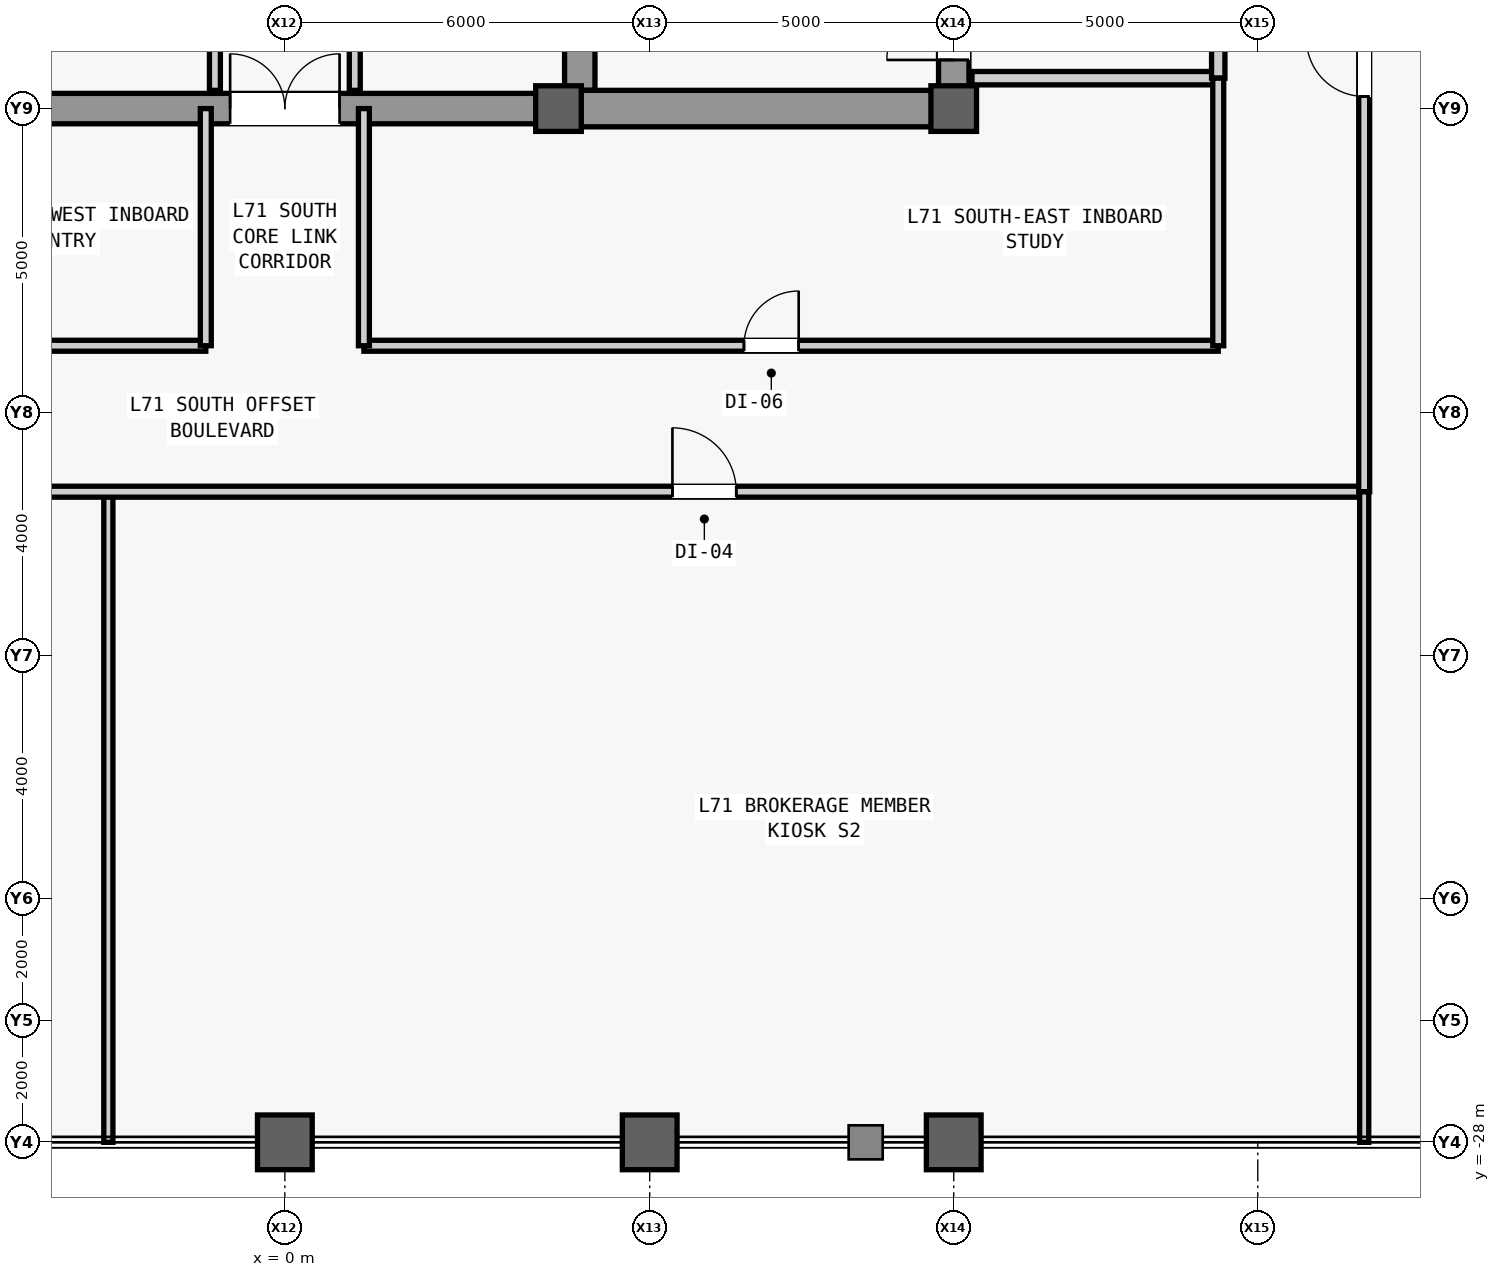
"""IFC4 building model, lengths in metres.
Left out: names, types, materials, properties, quantities, classifications, styles, units other than length and angle.
Written with IfcOpenShell. Run it as: python <this file> out.ifc"""

import sys

from ifc_helpers import new_model, si_unit, direction, frame, frame_2d, origin, origin_2d, place, context, subcontext, project, spatial, rectangle, hollow_rectangle, extrude, source, transform, mapped, element, fill, save


model = new_model("IFC4")
c1 = context("Model", 3, precision=1e-05, world=origin(), true_north=direction((0.0, 1.0)))
c2 = subcontext(c1, "Body", "Model", "MODEL_VIEW")
j1 = project(units=[si_unit("LENGTHUNIT", "METRE"), si_unit("PLANEANGLEUNIT", "RADIAN")], contexts=[c1])
p1 = place(None, origin())
s1 = spatial("IfcSite", under=j1, at=p1, CompositionType="ELEMENT")
p2 = place(p1, origin())
s2 = spatial("IfcBuilding", under=s1, at=p2, CompositionType="ELEMENT")
p3 = place(p2, frame((0.0, 0.0, 301.5)))
s3 = spatial("IfcBuildingStorey", under=s2, at=p3, CompositionType="ELEMENT", Elevation=301.5)
m1 = source(origin(), c2, "Body", "SweptSolid", [
    extrude(rectangle(XDim=22.0, YDim=0.5, at=frame_2d((11.0, 0.0))), origin(), (0.0, 0.0, 1.0), 3.78),
])
p4 = place(p3, frame((11.0, -11.0, 0.0), z_axis=(0.0, 0.0, 1.0), x_axis=(0.0, 1.0, 0.0)))
e1 = element("IfcWall", 1, at=p4, inside=s3, PredefinedType="SHEAR", context=c2, shape_type="MappedRepresentation", body=[
    mapped(m1, transform((0.0, 0.0, 0.0), scale=1.0)),
])
m2 = source(origin(), c2, "Body", "SweptSolid", [
    extrude(rectangle(XDim=1.1, YDim=2.2, at=frame_2d((0.55, 1.1))), frame((0.0, 0.26, 0.0), z_axis=(0.0, -1.0, 0.0), x_axis=(1.0, 0.0, 0.0)), (0.0, 0.0, 1.0), 0.52),
])
p5 = place(p4, frame((0.8, 0.0, 0.0)))
e2 = element("IfcOpeningElement", 2, at=p5, cuts=e1, PredefinedType="OPENING", context=c2, shape_type="MappedRepresentation", body=[
    mapped(m2, transform((0.0, 0.0, 0.0), scale=1.0)),
])
m3 = source(origin(), c2, "Body", "SweptSolid", [
    extrude(rectangle(XDim=0.9, YDim=2.15, at=frame_2d((0.45, 1.075))), frame((0.0, 0.26, 0.0), z_axis=(0.0, -1.0, 0.0), x_axis=(1.0, 0.0, 0.0)), (0.0, 0.0, 1.0), 0.52),
])
p6 = place(p4, frame((6.2, 0.0, 0.0)))
e3 = element("IfcOpeningElement", 3, at=p6, cuts=e1, PredefinedType="OPENING", context=c2, shape_type="MappedRepresentation", body=[
    mapped(m3, transform((0.0, 0.0, 0.0), scale=1.0)),
])
p7 = place(p4, frame((8.05, 0.0, 0.0)))
e4 = element("IfcOpeningElement", 4, at=p7, cuts=e1, PredefinedType="OPENING", context=c2, shape_type="MappedRepresentation", body=[
    mapped(m3, transform((0.0, 0.0, 0.0), scale=1.0)),
])
m4 = source(origin(), c2, "Body", "SweptSolid", [
    extrude(rectangle(XDim=1.2, YDim=2.3, at=frame_2d((0.6, 1.15))), frame((0.0, 0.26, 0.0), z_axis=(0.0, -1.0, 0.0), x_axis=(1.0, 0.0, 0.0)), (0.0, 0.0, 1.0), 0.52),
])
p8 = place(p4, frame((17.6, 0.0, 0.0)))
e5 = element("IfcOpeningElement", 5, at=p8, cuts=e1, PredefinedType="OPENING", context=c2, shape_type="MappedRepresentation", body=[
    mapped(m4, transform((0.0, 0.0, 0.0), scale=1.0)),
])
p9 = place(p4, frame((19.6, 0.0, 0.0)))
e6 = element("IfcOpeningElement", 6, at=p9, cuts=e1, PredefinedType="OPENING", context=c2, shape_type="MappedRepresentation", body=[
    mapped(m4, transform((0.0, 0.0, 0.0), scale=1.0)),
])
m5 = source(origin(), c2, "Body", "SweptSolid", [
    extrude(rectangle(XDim=1.3, YDim=2.3, at=frame_2d((0.65, 1.15))), frame((0.0, 0.26, 0.0), z_axis=(0.0, -1.0, 0.0), x_axis=(1.0, 0.0, 0.0)), (0.0, 0.0, 1.0), 0.52),
])
p10 = place(p4, frame((2.7, 0.0, 0.0)))
e7 = element("IfcOpeningElement", 7, at=p10, cuts=e1, PredefinedType="OPENING", context=c2, shape_type="MappedRepresentation", body=[
    mapped(m5, transform((0.0, 0.0, 0.0), scale=1.0)),
])
p11 = place(p4, frame((13.35, 0.0, 0.0)))
e8 = element("IfcOpeningElement", 8, at=p11, cuts=e1, PredefinedType="OPENING", context=c2, shape_type="MappedRepresentation", body=[
    mapped(m5, transform((0.0, 0.0, 0.0), scale=1.0)),
])
m6 = source(origin(), c2, "Body", "SweptSolid", [
    extrude(rectangle(XDim=21.4, YDim=0.5, at=frame_2d((10.7, 0.0))), origin(), (0.0, 0.0, 1.0), 3.78),
])
p12 = place(p3, frame((4.85, -10.7, 0.0), z_axis=(0.0, 0.0, 1.0), x_axis=(0.0, 1.0, 0.0)))
e9 = element("IfcWall", 9, at=p12, inside=s3, PredefinedType="SHEAR", context=c2, shape_type="MappedRepresentation", body=[
    mapped(m6, transform((0.0, 0.0, 0.0), scale=1.0)),
])
m7 = source(origin(), c2, "Body", "SweptSolid", [
    extrude(rectangle(XDim=5.9, YDim=0.6, at=frame_2d((2.95, 0.0))), origin(), (0.0, 0.0, 1.0), 3.78),
])
p13 = place(p3, frame((4.85, -11.0, 0.0), z_axis=(0.0, 0.0, 1.0), x_axis=(1.0, 0.0, 0.0)))
e10 = element("IfcWall", 10, at=p13, inside=s3, PredefinedType="SHEAR", context=c2, shape_type="MappedRepresentation", body=[
    mapped(m7, transform((0.0, 0.0, 0.0), scale=1.0)),
])
m8 = source(origin(), c2, "Body", "SweptSolid", [
    extrude(rectangle(XDim=9.2, YDim=0.5, at=frame_2d((4.6, 0.0))), origin(), (0.0, 0.0, 1.0), 3.78),
])
p14 = place(p3, frame((-4.6, -11.0, 0.0), z_axis=(0.0, 0.0, 1.0), x_axis=(1.0, 0.0, 0.0)))
e11 = element("IfcWall", 11, at=p14, inside=s3, PredefinedType="SHEAR", context=c2, shape_type="MappedRepresentation", body=[
    mapped(m8, transform((0.0, 0.0, 0.0), scale=1.0)),
])
m9 = source(origin(), c2, "Body", "SweptSolid", [
    extrude(rectangle(XDim=1.8, YDim=2.25, at=frame_2d((0.9, 1.125))), frame((0.0, 0.26, 0.0), z_axis=(0.0, -1.0, 0.0), x_axis=(1.0, 0.0, 0.0)), (0.0, 0.0, 1.0), 0.52),
])
p15 = place(p14, frame((3.7, 0.0, 0.0)))
e12 = element("IfcOpeningElement", 12, at=p15, cuts=e11, PredefinedType="OPENING", context=c2, shape_type="MappedRepresentation", body=[
    mapped(m9, transform((0.0, 0.0, 0.0), scale=1.0)),
])
m10 = source(origin(), c2, "Body", "SweptSolid", [
    extrude(hollow_rectangle(XDim=0.9, YDim=0.9, WallThickness=0.05, at=origin_2d()), origin(), (0.0, 0.0, 1.0), 4.0),
])
p16 = place(p3, frame((0.0, -28.0, 0.0), z_axis=(0.0, 0.0, 1.0), x_axis=(1.0, 0.0, 0.0)))
e13 = element("IfcColumn", 13, at=p16, inside=s3, PredefinedType="COLUMN", context=c2, shape_type="MappedRepresentation", body=[
    mapped(m10, transform((0.0, 0.0, 0.0), scale=1.0)),
])
m11 = source(origin(), c2, "Body", "SweptSolid", [
    extrude(rectangle(XDim=0.75, YDim=0.75, at=origin_2d()), origin(), (0.0, 0.0, 1.0), 4.0),
])
p17 = place(p3, frame((4.5, -11.0, 0.0), z_axis=(0.0, 0.0, 1.0), x_axis=(1.0, 0.0, 0.0)))
e14 = element("IfcColumn", 14, at=p17, inside=s3, PredefinedType="COLUMN", context=c2, shape_type="MappedRepresentation", body=[
    mapped(m11, transform((0.0, 0.0, 0.0), scale=1.0)),
])
for number, where, z_axis, x_axis in (
    (15, (6.0, -28.0, 0.0), (0.0, 0.0, 1.0), (1.0, 0.0, 0.0)),
    (16, (11.0, -28.0, 0.0), (0.0, 0.0, 1.0), (1.0, 0.0, 0.0)),
):
    element("IfcColumn", number, at=place(p3, frame(where, z_axis=z_axis, x_axis=x_axis)), inside=s3, PredefinedType="COLUMN", context=c2, shape_type="MappedRepresentation", body=[
        mapped(m10, transform((0.0, 0.0, 0.0), scale=1.0)),
    ])
p18 = place(p3, frame((11.0, -11.0, 0.0), z_axis=(0.0, 0.0, 1.0), x_axis=(1.0, 0.0, 0.0)))
e17 = element("IfcColumn", 17, at=p18, inside=s3, PredefinedType="COLUMN", context=c2, shape_type="MappedRepresentation", body=[
    mapped(m11, transform((0.0, 0.0, 0.0), scale=1.0)),
])
m12 = source(origin(), c2, "Body", "SweptSolid", [
    extrude(rectangle(XDim=4.05, YDim=0.22, at=frame_2d((2.025, 0.0))), origin(), (0.0, 0.0, 1.0), 3.78),
])
p19 = place(p3, frame((11.3, -10.5, 0.0), z_axis=(0.0, 0.0, 1.0), x_axis=(1.0, 0.0, 0.0)))
e18 = element("IfcWall", 18, at=p19, inside=s3, PredefinedType="PARTITIONING", context=c2, shape_type="MappedRepresentation", body=[
    mapped(m12, transform((0.0, 0.0, 0.0), scale=1.0)),
])
m13 = source(origin(), c2, "Body", "SweptSolid", [
    extrude(rectangle(XDim=4.4, YDim=0.22, at=frame_2d((2.2, 0.0))), origin(), (0.0, 0.0, 1.0), 3.78),
])
p20 = place(p3, frame((15.35, -10.5, 0.0), z_axis=(0.0, 0.0, 1.0), x_axis=(0.0, 1.0, 0.0)))
e19 = element("IfcWall", 19, at=p20, inside=s3, PredefinedType="PARTITIONING", context=c2, shape_type="MappedRepresentation", body=[
    mapped(m13, transform((0.0, 0.0, 0.0), scale=1.0)),
])
m14 = source(origin(), c2, "Body", "SweptSolid", [
    extrude(rectangle(XDim=1.2, YDim=2.2, at=frame_2d((0.6, 1.1))), frame((0.0, 0.12, 0.0), z_axis=(0.0, -1.0, 0.0), x_axis=(1.0, 0.0, 0.0)), (0.0, 0.0, 1.0), 0.24),
])
p21 = place(p20, frame((1.6, 0.0, 0.0)))
e20 = element("IfcOpeningElement", 20, at=p21, cuts=e19, PredefinedType="OPENING", context=c2, shape_type="MappedRepresentation", body=[
    mapped(m14, transform((0.0, 0.0, 0.0), scale=1.0)),
])
m15 = source(origin(), c2, "Body", "SweptSolid", [
    extrude(rectangle(XDim=5.4, YDim=0.18, at=frame_2d((2.7, 0.0))), origin(), (0.0, 0.0, 1.0), 3.78),
])
p22 = place(p3, frame((-1.15, -10.7, 0.0), z_axis=(0.0, 0.0, 1.0), x_axis=(0.0, 1.0, 0.0)))
e21 = element("IfcWall", 21, at=p22, inside=s3, PredefinedType="PARTITIONING", context=c2, shape_type="MappedRepresentation", body=[
    mapped(m15, transform((0.0, 0.0, 0.0), scale=1.0)),
])
m16 = source(origin(), c2, "Body", "SweptSolid", [
    extrude(rectangle(XDim=0.9, YDim=2.15, at=frame_2d((0.45, 1.075))), frame((0.0, 0.1, 0.0), z_axis=(0.0, -1.0, 0.0), x_axis=(1.0, 0.0, 0.0)), (0.0, 0.0, 1.0), 0.2),
])
p23 = place(p22, frame((0.9, 0.0, 0.0)))
e22 = element("IfcOpeningElement", 22, at=p23, cuts=e21, PredefinedType="OPENING", context=c2, shape_type="MappedRepresentation", body=[
    mapped(m16, transform((0.0, 0.0, 0.0), scale=1.0)),
])
p24 = place(p22, frame((3.6, 0.0, 0.0)))
e23 = element("IfcOpeningElement", 23, at=p24, cuts=e21, PredefinedType="OPENING", context=c2, shape_type="MappedRepresentation", body=[
    mapped(m16, transform((0.0, 0.0, 0.0), scale=1.0)),
])
p25 = place(p3, frame((1.15, -10.7, 0.0), z_axis=(0.0, 0.0, 1.0), x_axis=(0.0, 1.0, 0.0)))
e24 = element("IfcWall", 24, at=p25, inside=s3, PredefinedType="PARTITIONING", context=c2, shape_type="MappedRepresentation", body=[
    mapped(m15, transform((0.0, 0.0, 0.0), scale=1.0)),
])
p26 = place(p25, frame((2.25, 0.0, 0.0)))
e25 = element("IfcOpeningElement", 25, at=p26, cuts=e24, PredefinedType="OPENING", context=c2, shape_type="MappedRepresentation", body=[
    mapped(m16, transform((0.0, 0.0, 0.0), scale=1.0)),
])
m17 = source(origin(), c2, "Body", "SweptSolid", [
    extrude(rectangle(XDim=16.1, YDim=0.18, at=frame_2d((8.05, 0.0))), origin(), (0.0, 0.0, 1.0), 3.78),
])
p27 = place(p3, frame((-17.4, -14.9, 0.0), z_axis=(0.0, 0.0, 1.0), x_axis=(1.0, 0.0, 0.0)))
e26 = element("IfcWall", 26, at=p27, inside=s3, PredefinedType="PARTITIONING", context=c2, shape_type="MappedRepresentation", body=[
    mapped(m17, transform((0.0, 0.0, 0.0), scale=1.0)),
])
p28 = place(p27, frame((8.95, 0.0, 0.0)))
e27 = element("IfcOpeningElement", 27, at=p28, cuts=e26, PredefinedType="OPENING", context=c2, shape_type="MappedRepresentation", body=[
    mapped(m16, transform((0.0, 0.0, 0.0), scale=1.0)),
])
m18 = source(origin(), c2, "Body", "SweptSolid", [
    extrude(rectangle(XDim=3.9, YDim=0.18, at=frame_2d((1.95, 0.0))), origin(), (0.0, 0.0, 1.0), 3.78),
])
p29 = place(p3, frame((-1.3, -14.9, 0.0), z_axis=(0.0, 0.0, 1.0), x_axis=(0.0, 1.0, 0.0)))
e28 = element("IfcWall", 28, at=p29, inside=s3, PredefinedType="PARTITIONING", context=c2, shape_type="MappedRepresentation", body=[
    mapped(m18, transform((0.0, 0.0, 0.0), scale=1.0)),
])
m19 = source(origin(), c2, "Body", "SweptSolid", [
    extrude(rectangle(XDim=14.05, YDim=0.18, at=frame_2d((7.025, 0.0))), origin(), (0.0, 0.0, 1.0), 3.78),
])
p30 = place(p3, frame((1.3, -14.9, 0.0), z_axis=(0.0, 0.0, 1.0), x_axis=(1.0, 0.0, 0.0)))
e29 = element("IfcWall", 29, at=p30, inside=s3, PredefinedType="PARTITIONING", context=c2, shape_type="MappedRepresentation", body=[
    mapped(m19, transform((0.0, 0.0, 0.0), scale=1.0)),
])
p31 = place(p30, frame((6.25, 0.0, 0.0)))
e30 = element("IfcOpeningElement", 30, at=p31, cuts=e29, PredefinedType="OPENING", context=c2, shape_type="MappedRepresentation", body=[
    mapped(m16, transform((0.0, 0.0, 0.0), scale=1.0)),
])
p32 = place(p3, frame((1.3, -14.9, 0.0), z_axis=(0.0, 0.0, 1.0), x_axis=(0.0, 1.0, 0.0)))
e31 = element("IfcWall", 31, at=p32, inside=s3, PredefinedType="PARTITIONING", context=c2, shape_type="MappedRepresentation", body=[
    mapped(m18, transform((0.0, 0.0, 0.0), scale=1.0)),
])
m20 = source(origin(), c2, "Body", "SweptSolid", [
    extrude(rectangle(XDim=4.4, YDim=0.18, at=frame_2d((2.2, 0.0))), origin(), (0.0, 0.0, 1.0), 3.78),
])
p33 = place(p3, frame((15.35, -14.9, 0.0), z_axis=(0.0, 0.0, 1.0), x_axis=(0.0, 1.0, 0.0)))
e32 = element("IfcWall", 32, at=p33, inside=s3, PredefinedType="PARTITIONING", context=c2, shape_type="MappedRepresentation", body=[
    mapped(m20, transform((0.0, 0.0, 0.0), scale=1.0)),
])
m21 = source(origin(), c2, "Body", "SweptSolid", [
    extrude(rectangle(XDim=10.7, YDim=0.15, at=frame_2d((5.35, 0.0))), origin(), (0.0, 0.0, 1.0), 3.78),
])
p34 = place(p3, frame((-2.903, -28.0, 0.0), z_axis=(0.0, 0.0, 1.0), x_axis=(0.0, 1.0, 0.0)))
e33 = element("IfcWall", 33, at=p34, inside=s3, PredefinedType="PARTITIONING", context=c2, shape_type="MappedRepresentation", body=[
    mapped(m21, transform((0.0, 0.0, 0.0), scale=1.0)),
])
m22 = source(origin(), c2, "Body", "SweptSolid", [
    extrude(rectangle(XDim=37.55, YDim=0.18, at=frame_2d((18.775, 0.0))), origin(), (0.0, 0.0, 1.0), 3.78),
])
p35 = place(p3, frame((-19.8, -17.3, 0.0), z_axis=(0.0, 0.0, 1.0), x_axis=(1.0, 0.0, 0.0)))
e34 = element("IfcWall", 34, at=p35, inside=s3, PredefinedType="PARTITIONING", context=c2, shape_type="MappedRepresentation", body=[
    mapped(m22, transform((0.0, 0.0, 0.0), scale=1.0)),
])
m23 = source(origin(), c2, "Body", "SweptSolid", [
    extrude(rectangle(XDim=1.05, YDim=2.2, at=frame_2d((0.525, 1.1))), frame((0.0, 0.1, 0.0), z_axis=(0.0, -1.0, 0.0), x_axis=(1.0, 0.0, 0.0)), (0.0, 0.0, 1.0), 0.2),
])
p36 = place(p35, frame((8.424, 0.0, 0.0)))
e35 = element("IfcOpeningElement", 35, at=p36, cuts=e34, PredefinedType="OPENING", context=c2, shape_type="MappedRepresentation", body=[
    mapped(m23, transform((0.0, 0.0, 0.0), scale=1.0)),
])
p37 = place(p35, frame((26.174, 0.0, 0.0)))
e36 = element("IfcOpeningElement", 36, at=p37, cuts=e34, PredefinedType="OPENING", context=c2, shape_type="MappedRepresentation", body=[
    mapped(m23, transform((0.0, 0.0, 0.0), scale=1.0)),
])
p38 = place(p3, frame((17.75, -28.0, 0.0), z_axis=(0.0, 0.0, 1.0), x_axis=(0.0, 1.0, 0.0)))
e37 = element("IfcWall", 37, at=p38, inside=s3, PredefinedType="PARTITIONING", context=c2, shape_type="MappedRepresentation", body=[
    mapped(m21, transform((0.0, 0.0, 0.0), scale=1.0)),
])
m24 = source(origin(), c2, "Body", "SweptSolid", [
    extrude(rectangle(XDim=39.8, YDim=0.18, at=frame_2d((19.9, 0.0))), origin(), (0.0, 0.0, 1.0), 3.78),
])
p39 = place(p3, frame((17.75, -17.3, 0.0), z_axis=(0.0, 0.0, 1.0), x_axis=(0.0, 1.0, 0.0)))
e38 = element("IfcWall", 38, at=p39, inside=s3, PredefinedType="PARTITIONING", context=c2, shape_type="MappedRepresentation", body=[
    mapped(m24, transform((0.0, 0.0, 0.0), scale=1.0)),
])
m25 = source(origin(), c2, "Body", "SweptSolid", [
    extrude(rectangle(XDim=0.95, YDim=2.15, at=frame_2d((0.475, 1.075))), frame((0.0, 0.1, 0.0), z_axis=(0.0, -1.0, 0.0), x_axis=(1.0, 0.0, 0.0)), (0.0, 0.0, 1.0), 0.2),
])
p40 = place(p39, frame((6.5, 0.0, 0.0)))
e39 = element("IfcOpeningElement", 39, at=p40, cuts=e38, PredefinedType="OPENING", context=c2, shape_type="MappedRepresentation", body=[
    mapped(m25, transform((0.0, 0.0, 0.0), scale=1.0)),
])
p41 = place(p39, frame((15.32, 0.0, 0.0)))
e40 = element("IfcOpeningElement", 40, at=p41, cuts=e38, PredefinedType="OPENING", context=c2, shape_type="MappedRepresentation", body=[
    mapped(m25, transform((0.0, 0.0, 0.0), scale=1.0)),
])
p42 = place(p39, frame((24.995, 0.0, 0.0)))
e41 = element("IfcOpeningElement", 41, at=p42, cuts=e38, PredefinedType="OPENING", context=c2, shape_type="MappedRepresentation", body=[
    mapped(m25, transform((0.0, 0.0, 0.0), scale=1.0)),
])
m26 = source(origin(), c2, "Body", "SweptSolid", [
    extrude(rectangle(XDim=1.1, YDim=2.2, at=frame_2d((0.55, 1.1))), frame((0.0, 0.025, 0.0), z_axis=(0.0, -1.0, 0.0), x_axis=(1.0, 0.0, 0.0)), (0.0, 0.0, 1.0), 0.05),
])
p43 = place(p5, origin())
e42 = element("IfcDoor", 42, at=p43, inside=s3, OperationType="SINGLE_SWING_LEFT", PredefinedType="DOOR", context=c2, shape_type="MappedRepresentation", body=[
    mapped(m26, transform((0.0, 0.0, 0.0), scale=1.0)),
])
fill(e2, e42)
m27 = source(origin(), c2, "Body", "SweptSolid", [
    extrude(rectangle(XDim=1.8, YDim=2.25, at=frame_2d((0.9, 1.125))), frame((0.0, 0.025, 0.0), z_axis=(0.0, -1.0, 0.0), x_axis=(1.0, 0.0, 0.0)), (0.0, 0.0, 1.0), 0.05),
])
p44 = place(p15, origin())
e43 = element("IfcDoor", 43, at=p44, inside=s3, OperationType="SINGLE_SWING_LEFT", PredefinedType="DOOR", context=c2, shape_type="MappedRepresentation", body=[
    mapped(m27, transform((0.0, 0.0, 0.0), scale=1.0)),
])
fill(e12, e43)
m28 = source(origin(), c2, "Body", "SweptSolid", [
    extrude(rectangle(XDim=0.9, YDim=2.15, at=frame_2d((0.45, 1.075))), frame((0.0, 0.025, 0.0), z_axis=(0.0, -1.0, 0.0), x_axis=(1.0, 0.0, 0.0)), (0.0, 0.0, 1.0), 0.05),
])
p45 = place(p31, origin())
e44 = element("IfcDoor", 44, at=p45, inside=s3, OperationType="SINGLE_SWING_RIGHT", PredefinedType="DOOR", context=c2, shape_type="MappedRepresentation", body=[
    mapped(m28, transform((0.0, 0.0, 0.0), scale=1.0)),
])
fill(e30, e44)
m29 = source(origin(), c2, "Body", "SweptSolid", [
    extrude(rectangle(XDim=1.05, YDim=2.2, at=frame_2d((0.525, 1.1))), frame((0.0, 0.025, 0.0), z_axis=(0.0, -1.0, 0.0), x_axis=(1.0, 0.0, 0.0)), (0.0, 0.0, 1.0), 0.05),
])
p46 = place(p37, origin())
e45 = element("IfcDoor", 45, at=p46, inside=s3, OperationType="SINGLE_SWING_LEFT", PredefinedType="DOOR", context=c2, shape_type="MappedRepresentation", body=[
    mapped(m29, transform((0.0, 0.0, 0.0), scale=1.0)),
])
fill(e36, e45)
m30 = source(origin(), c2, "Body", "SweptSolid", [
    extrude(rectangle(XDim=0.95, YDim=2.15, at=frame_2d((0.475, 1.075))), frame((0.0, 0.025, 0.0), z_axis=(0.0, -1.0, 0.0), x_axis=(1.0, 0.0, 0.0)), (0.0, 0.0, 1.0), 0.05),
])
p47 = place(p40, origin())
e46 = element("IfcDoor", 46, at=p47, inside=s3, OperationType="SINGLE_SWING_RIGHT", PredefinedType="DOOR", context=c2, shape_type="MappedRepresentation", body=[
    mapped(m30, transform((0.0, 0.0, 0.0), scale=1.0)),
])
fill(e39, e46)
save(model, sys.argv[1])
